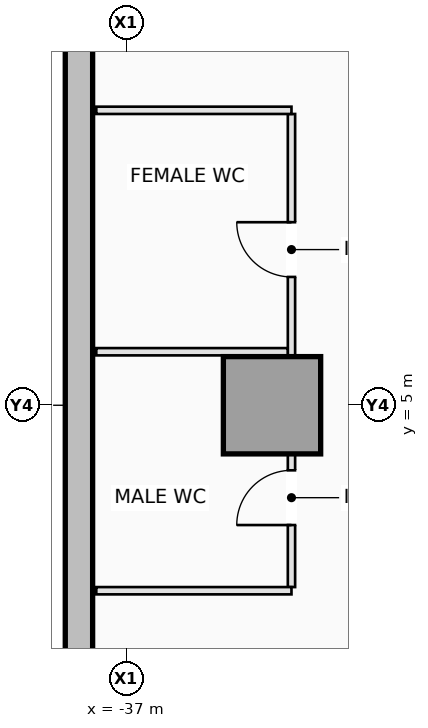
"""IFC4 building model, lengths in metres.
Left out: names, types, materials, properties, quantities, classifications, styles, units other than length and angle.
Written with IfcOpenShell. Run it as: python <this file> out.ifc"""

import sys

from ifc_helpers import new_model, si_unit, direction, frame, frame_2d, origin, origin_2d, place, context, subcontext, project, spatial, rectangle, extrude, element, fill, save


model = new_model("IFC4")
c1 = context("Model", 3, precision=1e-05, world=origin(), true_north=direction((0.0, 1.0)))
c2 = subcontext(c1, "Body", "Model", "MODEL_VIEW")
j1 = project(units=[si_unit("LENGTHUNIT", "METRE"), si_unit("PLANEANGLEUNIT", "RADIAN")], contexts=[c1])
p1 = place(None, origin())
s1 = spatial("IfcSite", under=j1, at=p1, CompositionType="ELEMENT")
p2 = place(p1, origin())
s2 = spatial("IfcBuilding", under=s1, at=p2, CompositionType="ELEMENT")
p3 = place(p2, frame((0.0, 0.0, -10.0)))
s3 = spatial("IfcBuildingStorey", under=s2, at=p3, CompositionType="ELEMENT", Elevation=-10.0)
p4 = place(p3, frame((-37.775, -25.832, 0.0), z_axis=(0.0, 0.0, 1.0), x_axis=(0.0, 1.0, 0.0)))
e1 = element("IfcWall", 1, at=p4, inside=s3, PredefinedType="USERDEFINED", context=c2, shape_type="SweptSolid", body=[
    extrude(rectangle(XDim=51.438, YDim=0.45, at=frame_2d((25.719, 0.0))), origin(), (0.0, 0.0, 1.0), 5.0),
])
p5 = place(p3, frame((-34.6, 5.0, -0.45), z_axis=(0.0, 0.0, 1.0), x_axis=(1.0, 0.0, 0.0)))
e2 = element("IfcColumn", 2, at=p5, inside=s3, PredefinedType="COLUMN", context=c2, shape_type="SweptSolid", body=[
    extrude(rectangle(XDim=1.6, YDim=1.6, at=origin_2d()), origin(), (0.0, 0.0, 1.0), 5.45),
])
p6 = place(p3, frame((-34.28, 2.01, 0.0), z_axis=(0.0, 0.0, 1.0), x_axis=(0.0, 1.0, 0.0)))
e3 = element("IfcWall", 3, at=p6, inside=s3, PredefinedType="PARTITIONING", context=c2, shape_type="SweptSolid", body=[
    extrude(rectangle(XDim=2.188, YDim=0.12, at=frame_2d((1.094, 0.0))), origin(), (0.0, 0.0, 1.0), 4.68),
])
p7 = place(p6, frame((1.02, 0.0, 0.0)))
e4 = element("IfcOpeningElement", 4, at=p7, cuts=e3, PredefinedType="OPENING", context=c2, shape_type="SweptSolid", body=[
    extrude(rectangle(XDim=0.9, YDim=2.12, at=frame_2d((0.45, 1.06))), frame((0.0, 0.07, 0.0), z_axis=(0.0, -1.0, 0.0), x_axis=(1.0, 0.0, 0.0)), (0.0, 0.0, 1.0), 0.14),
])
p8 = place(p3, frame((-34.28, 5.802, 0.0), z_axis=(0.0, 0.0, 1.0), x_axis=(0.0, 1.0, 0.0)))
e5 = element("IfcWall", 5, at=p8, inside=s3, PredefinedType="PARTITIONING", context=c2, shape_type="SweptSolid", body=[
    extrude(rectangle(XDim=3.988, YDim=0.12, at=frame_2d((1.994, 0.0))), origin(), (0.0, 0.0, 1.0), 4.68),
])
p9 = place(p8, frame((1.308, 0.0, 0.0)))
e6 = element("IfcOpeningElement", 6, at=p9, cuts=e5, PredefinedType="OPENING", context=c2, shape_type="SweptSolid", body=[
    extrude(rectangle(XDim=0.9, YDim=2.12, at=frame_2d((0.45, 1.06))), frame((0.0, 0.07, 0.0), z_axis=(0.0, -1.0, 0.0), x_axis=(1.0, 0.0, 0.0)), (0.0, 0.0, 1.0), 0.14),
])
p10 = place(p3, frame((-37.49, 5.88, 0.0), z_axis=(0.0, 0.0, 1.0), x_axis=(1.0, 0.0, 0.0)))
e7 = element("IfcWall", 7, at=p10, inside=s3, PredefinedType="PARTITIONING", context=c2, shape_type="SweptSolid", body=[
    extrude(rectangle(XDim=3.148, YDim=0.12, at=frame_2d((1.574, 0.0))), origin(), (0.0, 0.0, 1.0), 4.68),
])
for number, where, z_axis, x_axis in (
    (8, (-37.49, 1.95, 0.0), (0.0, 0.0, 1.0), (1.0, 0.0, 0.0)),
    (9, (-37.49, 9.85, 0.0), (0.0, 0.0, 1.0), (1.0, 0.0, 0.0)),
):
    element("IfcWall", number, at=place(p3, frame(where, z_axis=z_axis, x_axis=x_axis)), inside=s3, PredefinedType="PARTITIONING", context=c2, shape_type="SweptSolid", body=[
        extrude(rectangle(XDim=3.21, YDim=0.12, at=frame_2d((1.605, 0.0))), origin(), (0.0, 0.0, 1.0), 4.68),
    ])
p11 = place(p7, origin())
e10 = element("IfcDoor", 10, at=p11, inside=s3, OperationType="SINGLE_SWING_LEFT", PredefinedType="DOOR", context=c2, shape_type="SweptSolid", body=[
    extrude(rectangle(XDim=0.9, YDim=2.12, at=frame_2d((0.45, 1.06))), frame((0.0, 0.025, 0.0), z_axis=(0.0, -1.0, 0.0), x_axis=(1.0, 0.0, 0.0)), (0.0, 0.0, 1.0), 0.05),
])
fill(e4, e10)
p12 = place(p9, origin())
e11 = element("IfcDoor", 11, at=p12, inside=s3, OperationType="SINGLE_SWING_RIGHT", PredefinedType="DOOR", context=c2, shape_type="SweptSolid", body=[
    extrude(rectangle(XDim=0.9, YDim=2.12, at=frame_2d((0.45, 1.06))), frame((0.0, 0.025, 0.0), z_axis=(0.0, -1.0, 0.0), x_axis=(1.0, 0.0, 0.0)), (0.0, 0.0, 1.0), 0.05),
])
fill(e6, e11)
save(model, sys.argv[1])
